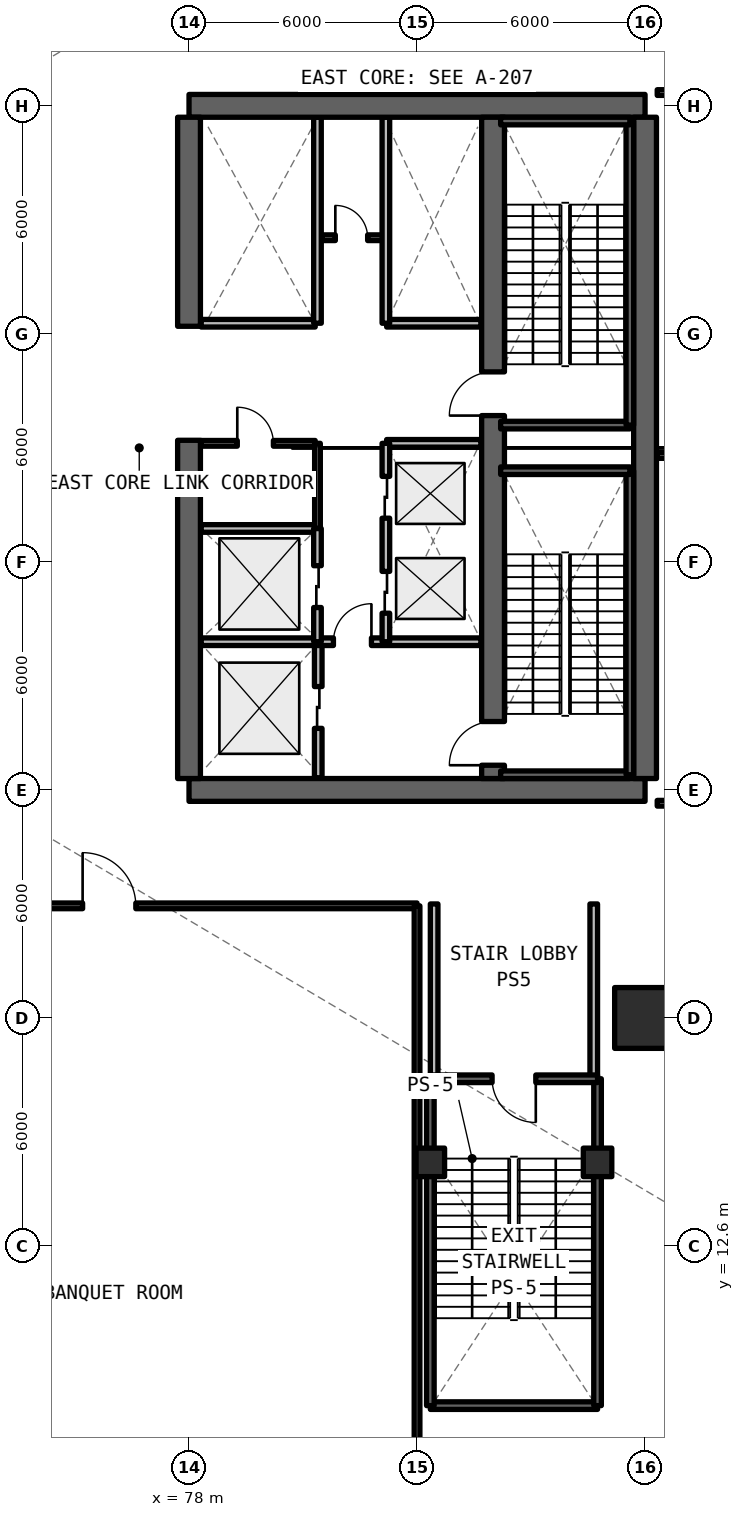
"""IFC4 building model, lengths in metres.
Left out: names, types, materials, properties, quantities, classifications, styles, units other than length and angle.
Written with IfcOpenShell. Run it as: python <this file> out.ifc"""

import sys

from ifc_helpers import new_model, si_unit, direction, frame, frame_2d, origin, origin_2d, place, context, subcontext, project, spatial, rectangle, extrude, element, fill, save


model = new_model("IFC4")
c1 = context("Model", 3, precision=1e-05, world=origin(), true_north=direction((0.0, 1.0)))
c2 = subcontext(c1, "Body", "Model", "MODEL_VIEW")
j1 = project(units=[si_unit("LENGTHUNIT", "METRE"), si_unit("PLANEANGLEUNIT", "RADIAN")], contexts=[c1])
p1 = place(None, origin())
s1 = spatial("IfcSite", under=j1, at=p1, CompositionType="ELEMENT")
p2 = place(p1, origin())
s2 = spatial("IfcBuilding", under=s1, at=p2, CompositionType="ELEMENT")
p3 = place(p2, frame((0.0, 0.0, 9.9)))
s3 = spatial("IfcBuildingStorey", under=s2, at=p3, CompositionType="ELEMENT", Elevation=9.9)
for number, where, z_axis, x_axis in (
    (1, (78.0, 24.6, 0.0), (0.0, 0.0, 1.0), (1.0, 0.0, 0.0)),
    (2, (90.0, 42.6, 0.0), (0.0, 0.0, 1.0), (-1.0, 0.0, 0.0)),
):
    element("IfcWall", number, at=place(p3, frame(where, z_axis=z_axis, x_axis=x_axis)), inside=s3, PredefinedType="SHEAR", context=c2, shape_type="SweptSolid", body=[
        extrude(rectangle(XDim=12.0, YDim=0.6, at=frame_2d((6.0, 0.0))), origin(), (0.0, 0.0, 1.0), 4.95),
    ])
p4 = place(p3, frame((90.0, 24.9, 0.0), z_axis=(0.0, 0.0, 1.0), x_axis=(0.0, 1.0, 0.0)))
e3 = element("IfcWall", 3, at=p4, inside=s3, PredefinedType="SHEAR", context=c2, shape_type="SweptSolid", body=[
    extrude(rectangle(XDim=17.4, YDim=0.6, at=frame_2d((8.7, 0.0))), origin(), (0.0, 0.0, 1.0), 4.95),
])
p5 = place(p3, frame((78.0, 24.9, 0.0), z_axis=(0.0, 0.0, 1.0), x_axis=(0.0, 1.0, 0.0)))
e4 = element("IfcWall", 4, at=p5, inside=s3, PredefinedType="SHEAR", context=c2, shape_type="SweptSolid", body=[
    extrude(rectangle(XDim=8.9, YDim=0.6, at=frame_2d((4.45, 0.0))), origin(), (0.0, 0.0, 1.0), 4.95),
])
p6 = place(p3, frame((78.0, 36.8, 0.0), z_axis=(0.0, 0.0, 1.0), x_axis=(0.0, 1.0, 0.0)))
e5 = element("IfcWall", 5, at=p6, inside=s3, PredefinedType="SHEAR", context=c2, shape_type="SweptSolid", body=[
    extrude(rectangle(XDim=5.5, YDim=0.6, at=frame_2d((2.75, 0.0))), origin(), (0.0, 0.0, 1.0), 4.95),
])
p7 = place(p3, frame((86.0, 24.9, 0.0), z_axis=(0.0, 0.0, 1.0), x_axis=(0.0, 1.0, 0.0)))
e6 = element("IfcWall", 6, at=p7, inside=s3, PredefinedType="SHEAR", context=c2, shape_type="SweptSolid", body=[
    extrude(rectangle(XDim=17.4, YDim=0.6, at=frame_2d((8.7, 0.0))), origin(), (0.0, 0.0, 1.0), 4.95),
])
p8 = place(p7, frame((0.35, 0.0, 0.0)))
e7 = element("IfcOpeningElement", 7, at=p8, cuts=e6, PredefinedType="OPENING", context=c2, shape_type="SweptSolid", body=[
    extrude(rectangle(XDim=1.15, YDim=2.15, at=frame_2d((0.575, 1.075))), frame((0.0, 0.31, 0.0), z_axis=(0.0, -1.0, 0.0), x_axis=(1.0, 0.0, 0.0)), (0.0, 0.0, 1.0), 0.62),
])
p9 = place(p7, frame((9.55, 0.0, 0.0)))
e8 = element("IfcOpeningElement", 8, at=p9, cuts=e6, PredefinedType="OPENING", context=c2, shape_type="SweptSolid", body=[
    extrude(rectangle(XDim=1.15, YDim=2.15, at=frame_2d((0.575, 1.075))), frame((0.0, 0.31, 0.0), z_axis=(0.0, -1.0, 0.0), x_axis=(1.0, 0.0, 0.0)), (0.0, 0.0, 1.0), 0.62),
])
p10 = place(p3, frame((90.0, 18.6, 0.0), z_axis=(0.0, 0.0, 1.0), x_axis=(1.0, 0.0, 0.0)))
e9 = element("IfcColumn", 9, at=p10, inside=s3, PredefinedType="COLUMN", context=c2, shape_type="SweptSolid", body=[
    extrude(rectangle(XDim=1.6, YDim=1.6, at=origin_2d()), origin(), (0.0, 0.0, 1.0), 4.95),
])
for number, where, z_axis, x_axis in (
    (10, (84.35, 14.8, 0.0), (0.0, 0.0, 1.0), (1.0, 0.0, 0.0)),
    (11, (88.75, 14.8, 0.0), (0.0, 0.0, 1.0), (1.0, 0.0, 0.0)),
):
    element("IfcColumn", number, at=place(p3, frame(where, z_axis=z_axis, x_axis=x_axis)), inside=s3, PredefinedType="COLUMN", context=c2, shape_type="SweptSolid", body=[
        extrude(rectangle(XDim=0.75, YDim=0.75, at=origin_2d()), origin(), (0.0, 0.0, 1.0), 4.95),
    ])
p11 = place(p3, frame((81.4, 24.92, 0.0), z_axis=(0.0, 0.0, 1.0), x_axis=(0.0, 1.0, 0.0)))
e12 = element("IfcWall", 12, at=p11, inside=s3, PredefinedType="SOLIDWALL", context=c2, shape_type="SweptSolid", body=[
    extrude(rectangle(XDim=3.58, YDim=0.2, at=frame_2d((1.79, 0.0))), origin(), (0.0, 0.0, 1.0), 3.89),
])
p12 = place(p11, frame((1.3, 0.0, 0.0)))
e13 = element("IfcOpeningElement", 13, at=p12, cuts=e12, PredefinedType="OPENING", context=c2, shape_type="SweptSolid", body=[
    extrude(rectangle(XDim=1.1, YDim=2.2, at=frame_2d((0.55, 1.1))), frame((0.0, 0.11, 0.0), z_axis=(0.0, -1.0, 0.0), x_axis=(1.0, 0.0, 0.0)), (0.0, 0.0, 1.0), 0.22),
])
p13 = place(p3, frame((78.32, 28.5, 0.0), z_axis=(0.0, 0.0, 1.0), x_axis=(1.0, 0.0, 0.0)))
e14 = element("IfcWall", 14, at=p13, inside=s3, PredefinedType="SOLIDWALL", context=c2, shape_type="SweptSolid", body=[
    extrude(rectangle(XDim=7.36, YDim=0.2, at=frame_2d((3.68, 0.0))), origin(), (0.0, 0.0, 1.0), 3.89),
])
p14 = place(p13, frame((3.48, 0.0, 0.0)))
e15 = element("IfcOpeningElement", 15, at=p14, cuts=e14, PredefinedType="OPENING", context=c2, shape_type="SweptSolid", body=[
    extrude(rectangle(XDim=1.0, YDim=2.15, at=frame_2d((0.5, 1.075))), frame((0.0, 0.11, 0.0), z_axis=(0.0, -1.0, 0.0), x_axis=(1.0, 0.0, 0.0)), (0.0, 0.0, 1.0), 0.22),
])
p15 = place(p3, frame((81.5, 39.13, 0.0), z_axis=(0.0, 0.0, 1.0), x_axis=(1.0, 0.0, 0.0)))
e16 = element("IfcWall", 16, at=p15, inside=s3, PredefinedType="SOLIDWALL", context=c2, shape_type="SweptSolid", body=[
    extrude(rectangle(XDim=1.6, YDim=0.15, at=frame_2d((0.8, 0.0))), origin(), (0.0, 0.0, 1.0), 3.89),
])
p16 = place(p15, frame((0.35, 0.0, 0.0)))
e17 = element("IfcOpeningElement", 17, at=p16, cuts=e16, PredefinedType="OPENING", context=c2, shape_type="SweptSolid", body=[
    extrude(rectangle(XDim=0.85, YDim=2.1, at=frame_2d((0.425, 1.05))), frame((0.0, 0.085, 0.0), z_axis=(0.0, -1.0, 0.0), x_axis=(1.0, 0.0, 0.0)), (0.0, 0.0, 1.0), 0.17),
])
p17 = place(p3, frame((83.2, 33.72, 0.0), z_axis=(0.0, 0.0, 1.0), x_axis=(1.0, 0.0, 0.0)))
e18 = element("IfcWall", 18, at=p17, inside=s3, PredefinedType="SOLIDWALL", context=c2, shape_type="SweptSolid", body=[
    extrude(rectangle(XDim=2.48, YDim=0.2, at=frame_2d((1.24, 0.0))), origin(), (0.0, 0.0, 1.0), 3.89),
])
p18 = place(p3, frame((83.18, 28.5, 0.0), z_axis=(0.0, 0.0, 1.0), x_axis=(0.0, 1.0, 0.0)))
e19 = element("IfcWall", 19, at=p18, inside=s3, PredefinedType="SOLIDWALL", context=c2, shape_type="SweptSolid", body=[
    extrude(rectangle(XDim=5.22, YDim=0.2, at=frame_2d((2.61, 0.0))), origin(), (0.0, 0.0, 1.0), 3.89),
])
p19 = place(p18, frame((0.75, 0.0, 0.0)))
e20 = element("IfcOpeningElement", 20, at=p19, cuts=e19, PredefinedType="OPENING", context=c2, shape_type="SweptSolid", body=[
    extrude(rectangle(XDim=1.1, YDim=2.2, at=frame_2d((0.55, 1.1))), frame((0.0, 0.11, 0.0), z_axis=(0.0, -1.0, 0.0), x_axis=(1.0, 0.0, 0.0)), (0.0, 0.0, 1.0), 0.22),
])
p20 = place(p18, frame((3.25, 0.0, 0.0)))
e21 = element("IfcOpeningElement", 21, at=p20, cuts=e19, PredefinedType="OPENING", context=c2, shape_type="SweptSolid", body=[
    extrude(rectangle(XDim=1.1, YDim=2.2, at=frame_2d((0.55, 1.1))), frame((0.0, 0.11, 0.0), z_axis=(0.0, -1.0, 0.0), x_axis=(1.0, 0.0, 0.0)), (0.0, 0.0, 1.0), 0.22),
])
p21 = place(p3, frame((78.32, 31.48, 0.0), z_axis=(0.0, 0.0, 1.0), x_axis=(1.0, 0.0, 0.0)))
e22 = element("IfcWall", 22, at=p21, inside=s3, PredefinedType="SOLIDWALL", context=c2, shape_type="SweptSolid", body=[
    extrude(rectangle(XDim=3.0, YDim=0.2, at=frame_2d((1.5, 0.0))), origin(), (0.0, 0.0, 1.0), 3.89),
])
p22 = place(p3, frame((81.38, 28.5, 0.0), z_axis=(0.0, 0.0, 1.0), x_axis=(0.0, 1.0, 0.0)))
e23 = element("IfcWall", 23, at=p22, inside=s3, PredefinedType="SOLIDWALL", context=c2, shape_type="SweptSolid", body=[
    extrude(rectangle(XDim=2.98, YDim=0.2, at=frame_2d((1.49, 0.0))), origin(), (0.0, 0.0, 1.0), 3.89),
])
p23 = place(p22, frame((0.9, 0.0, 0.0)))
e24 = element("IfcOpeningElement", 24, at=p23, cuts=e23, PredefinedType="OPENING", context=c2, shape_type="SweptSolid", body=[
    extrude(rectangle(XDim=1.1, YDim=2.2, at=frame_2d((0.55, 1.1))), frame((0.0, 0.11, 0.0), z_axis=(0.0, -1.0, 0.0), x_axis=(1.0, 0.0, 0.0)), (0.0, 0.0, 1.0), 0.22),
])
p24 = place(p3, frame((81.38, 31.48, 0.0), z_axis=(0.0, 0.0, 1.0), x_axis=(0.0, 1.0, 0.0)))
e25 = element("IfcWall", 25, at=p24, inside=s3, PredefinedType="SOLIDWALL", context=c2, shape_type="SweptSolid", body=[
    extrude(rectangle(XDim=2.24, YDim=0.15, at=frame_2d((1.12, 0.0))), origin(), (0.0, 0.0, 1.0), 3.89),
])
p25 = place(p3, frame((78.32, 33.72, 0.0), z_axis=(0.0, 0.0, 1.0), x_axis=(1.0, 0.0, 0.0)))
e26 = element("IfcWall", 26, at=p25, inside=s3, PredefinedType="SOLIDWALL", context=c2, shape_type="SweptSolid", body=[
    extrude(rectangle(XDim=3.0, YDim=0.15, at=frame_2d((1.5, 0.0))), origin(), (0.0, 0.0, 1.0), 3.89),
])
p26 = place(p25, frame((0.95, 0.0, 0.0)))
e27 = element("IfcOpeningElement", 27, at=p26, cuts=e26, PredefinedType="OPENING", context=c2, shape_type="SweptSolid", body=[
    extrude(rectangle(XDim=0.95, YDim=2.15, at=frame_2d((0.475, 1.075))), frame((0.0, 0.085, 0.0), z_axis=(0.0, -1.0, 0.0), x_axis=(1.0, 0.0, 0.0)), (0.0, 0.0, 1.0), 0.17),
])
p27 = place(p3, frame((83.2, 36.88, 0.0), z_axis=(0.0, 0.0, 1.0), x_axis=(1.0, 0.0, 0.0)))
e28 = element("IfcWall", 28, at=p27, inside=s3, PredefinedType="SOLIDWALL", context=c2, shape_type="SweptSolid", body=[
    extrude(rectangle(XDim=2.48, YDim=0.2, at=frame_2d((1.24, 0.0))), origin(), (0.0, 0.0, 1.0), 3.89),
])
p28 = place(p3, frame((83.18, 36.88, 0.0), z_axis=(0.0, 0.0, 1.0), x_axis=(0.0, 1.0, 0.0)))
e29 = element("IfcWall", 29, at=p28, inside=s3, PredefinedType="SOLIDWALL", context=c2, shape_type="SweptSolid", body=[
    extrude(rectangle(XDim=5.42, YDim=0.2, at=frame_2d((2.71, 0.0))), origin(), (0.0, 0.0, 1.0), 3.89),
])
p29 = place(p3, frame((78.32, 36.88, 0.0), z_axis=(0.0, 0.0, 1.0), x_axis=(1.0, 0.0, 0.0)))
e30 = element("IfcWall", 30, at=p29, inside=s3, PredefinedType="SOLIDWALL", context=c2, shape_type="SweptSolid", body=[
    extrude(rectangle(XDim=3.0, YDim=0.2, at=frame_2d((1.5, 0.0))), origin(), (0.0, 0.0, 1.0), 3.89),
])
p30 = place(p3, frame((81.38, 36.88, 0.0), z_axis=(0.0, 0.0, 1.0), x_axis=(0.0, 1.0, 0.0)))
e31 = element("IfcWall", 31, at=p30, inside=s3, PredefinedType="SOLIDWALL", context=c2, shape_type="SweptSolid", body=[
    extrude(rectangle(XDim=5.42, YDim=0.2, at=frame_2d((2.71, 0.0))), origin(), (0.0, 0.0, 1.0), 3.89),
])
for number, where, z_axis, x_axis in (
    (32, (84.45, 17.0, 0.0), (0.0, 0.0, 1.0), (0.0, 1.0, 0.0)),
    (33, (88.65, 17.0, 0.0), (0.0, 0.0, 1.0), (0.0, 1.0, 0.0)),
):
    element("IfcWall", number, at=place(p3, frame(where, z_axis=z_axis, x_axis=x_axis)), inside=s3, PredefinedType="SOLIDWALL", context=c2, shape_type="SweptSolid", body=[
        extrude(rectangle(XDim=4.6, YDim=0.2, at=frame_2d((2.3, 0.0))), origin(), (0.0, 0.0, 1.0), 3.89),
    ])
p31 = place(p3, frame((67.9, 21.55, 0.0), z_axis=(0.0, 0.0, 1.0), x_axis=(1.0, 0.0, 0.0)))
e34 = element("IfcWall", 34, at=p31, inside=s3, PredefinedType="SOLIDWALL", context=c2, shape_type="SweptSolid", body=[
    extrude(rectangle(XDim=16.1, YDim=0.15, at=frame_2d((8.05, 0.0))), origin(), (0.0, 0.0, 1.0), 3.89),
])
p32 = place(p31, frame((7.3, 0.0, 0.0)))
e35 = element("IfcOpeningElement", 35, at=p32, cuts=e34, PredefinedType="OPENING", context=c2, shape_type="SweptSolid", body=[
    extrude(rectangle(XDim=1.4, YDim=2.15, at=frame_2d((0.7, 1.075))), frame((0.0, 0.085, 0.0), z_axis=(0.0, -1.0, 0.0), x_axis=(1.0, 0.0, 0.0)), (0.0, 0.0, 1.0), 0.17),
])
p33 = place(p3, frame((84.0, 2.3, 0.0), z_axis=(0.0, 0.0, 1.0), x_axis=(0.0, 1.0, 0.0)))
e36 = element("IfcWall", 36, at=p33, inside=s3, PredefinedType="SOLIDWALL", context=c2, shape_type="SweptSolid", body=[
    extrude(rectangle(XDim=19.25, YDim=0.15, at=frame_2d((9.625, 0.0))), origin(), (0.0, 0.0, 1.0), 3.89),
])
p34 = place(p3, frame((90.32, 24.25, 0.0), z_axis=(0.0, 0.0, 1.0), x_axis=(1.0, 0.0, 0.0)))
e37 = element("IfcWall", 37, at=p34, inside=s3, PredefinedType="SOLIDWALL", context=c2, shape_type="SweptSolid", body=[
    extrude(rectangle(XDim=16.68, YDim=0.15, at=frame_2d((8.34, 0.0))), origin(), (0.0, 0.0, 1.0), 3.89),
])
p35 = place(p34, frame((7.79, 0.0, 0.0)))
e38 = element("IfcOpeningElement", 38, at=p35, cuts=e37, PredefinedType="OPENING", context=c2, shape_type="SweptSolid", body=[
    extrude(rectangle(XDim=1.1, YDim=2.15, at=frame_2d((0.55, 1.075))), frame((0.0, 0.085, 0.0), z_axis=(0.0, -1.0, 0.0), x_axis=(1.0, 0.0, 0.0)), (0.0, 0.0, 1.0), 0.17),
])
p36 = place(p3, frame((90.32, 33.4, 0.0), z_axis=(0.0, 0.0, 1.0), x_axis=(1.0, 0.0, 0.0)))
e39 = element("IfcWall", 39, at=p36, inside=s3, PredefinedType="SOLIDWALL", context=c2, shape_type="SweptSolid", body=[
    extrude(rectangle(XDim=16.68, YDim=0.15, at=frame_2d((8.34, 0.0))), origin(), (0.0, 0.0, 1.0), 3.89),
])
p37 = place(p3, frame((90.32, 42.95, 0.0), z_axis=(0.0, 0.0, 1.0), x_axis=(1.0, 0.0, 0.0)))
e40 = element("IfcWall", 40, at=p37, inside=s3, PredefinedType="SOLIDWALL", context=c2, shape_type="SweptSolid", body=[
    extrude(rectangle(XDim=16.68, YDim=0.15, at=frame_2d((8.34, 0.0))), origin(), (0.0, 0.0, 1.0), 3.89),
])
p38 = place(p37, frame((7.79, 0.0, 0.0)))
e41 = element("IfcOpeningElement", 41, at=p38, cuts=e40, PredefinedType="OPENING", context=c2, shape_type="SweptSolid", body=[
    extrude(rectangle(XDim=1.1, YDim=2.15, at=frame_2d((0.55, 1.075))), frame((0.0, 0.085, 0.0), z_axis=(0.0, -1.0, 0.0), x_axis=(1.0, 0.0, 0.0)), (0.0, 0.0, 1.0), 0.17),
])
p39 = place(p3, frame((86.2, 25.0, 0.0), z_axis=(0.0, 0.0, 1.0), x_axis=(1.0, 0.0, 0.0)))
e42 = element("IfcWall", 42, at=p39, inside=s3, PredefinedType="SOLIDWALL", context=c2, shape_type="SweptSolid", body=[
    extrude(rectangle(XDim=3.4, YDim=0.2, at=frame_2d((1.7, 0.0))), origin(), (0.0, 0.0, 1.0), 4.95),
])
p40 = place(p3, frame((89.6, 25.0, 0.0), z_axis=(0.0, 0.0, 1.0), x_axis=(0.0, 1.0, 0.0)))
e43 = element("IfcWall", 43, at=p40, inside=s3, PredefinedType="SOLIDWALL", context=c2, shape_type="SweptSolid", body=[
    extrude(rectangle(XDim=8.0, YDim=0.2, at=frame_2d((4.0, 0.0))), origin(), (0.0, 0.0, 1.0), 4.95),
])
for number, where, z_axis, x_axis in (
    (44, (89.6, 33.0, 0.0), (0.0, 0.0, 1.0), (-1.0, 0.0, 0.0)),
    (45, (86.2, 34.2, 0.0), (0.0, 0.0, 1.0), (1.0, 0.0, 0.0)),
):
    element("IfcWall", number, at=place(p3, frame(where, z_axis=z_axis, x_axis=x_axis)), inside=s3, PredefinedType="SOLIDWALL", context=c2, shape_type="SweptSolid", body=[
        extrude(rectangle(XDim=3.4, YDim=0.2, at=frame_2d((1.7, 0.0))), origin(), (0.0, 0.0, 1.0), 4.95),
    ])
p41 = place(p3, frame((89.6, 34.2, 0.0), z_axis=(0.0, 0.0, 1.0), x_axis=(0.0, 1.0, 0.0)))
e46 = element("IfcWall", 46, at=p41, inside=s3, PredefinedType="SOLIDWALL", context=c2, shape_type="SweptSolid", body=[
    extrude(rectangle(XDim=8.0, YDim=0.2, at=frame_2d((4.0, 0.0))), origin(), (0.0, 0.0, 1.0), 4.95),
])
p42 = place(p3, frame((89.6, 42.2, 0.0), z_axis=(0.0, 0.0, 1.0), x_axis=(-1.0, 0.0, 0.0)))
e47 = element("IfcWall", 47, at=p42, inside=s3, PredefinedType="SOLIDWALL", context=c2, shape_type="SweptSolid", body=[
    extrude(rectangle(XDim=3.4, YDim=0.2, at=frame_2d((1.7, 0.0))), origin(), (0.0, 0.0, 1.0), 4.95),
])
p43 = place(p3, frame((84.35, 8.4, 0.0), z_axis=(0.0, 0.0, 1.0), x_axis=(1.0, 0.0, 0.0)))
e48 = element("IfcWall", 48, at=p43, inside=s3, PredefinedType="SOLIDWALL", context=c2, shape_type="SweptSolid", body=[
    extrude(rectangle(XDim=4.4, YDim=0.2, at=frame_2d((2.2, 0.0))), origin(), (0.0, 0.0, 1.0), 4.95),
])
p44 = place(p3, frame((88.75, 8.4, 0.0), z_axis=(0.0, 0.0, 1.0), x_axis=(0.0, 1.0, 0.0)))
e49 = element("IfcWall", 49, at=p44, inside=s3, PredefinedType="SOLIDWALL", context=c2, shape_type="SweptSolid", body=[
    extrude(rectangle(XDim=8.6, YDim=0.2, at=frame_2d((4.3, 0.0))), origin(), (0.0, 0.0, 1.0), 4.95),
])
p45 = place(p3, frame((88.75, 17.0, 0.0), z_axis=(0.0, 0.0, 1.0), x_axis=(-1.0, 0.0, 0.0)))
e50 = element("IfcWall", 50, at=p45, inside=s3, PredefinedType="SOLIDWALL", context=c2, shape_type="SweptSolid", body=[
    extrude(rectangle(XDim=4.4, YDim=0.2, at=frame_2d((2.2, 0.0))), origin(), (0.0, 0.0, 1.0), 4.95),
])
p46 = place(p45, frame((1.625, 0.0, 0.0)))
e51 = element("IfcOpeningElement", 51, at=p46, cuts=e50, PredefinedType="OPENING", context=c2, shape_type="SweptSolid", body=[
    extrude(rectangle(XDim=1.15, YDim=2.15, at=frame_2d((0.575, 1.075))), frame((0.0, 0.11, 0.0), z_axis=(0.0, -1.0, 0.0), x_axis=(1.0, 0.0, 0.0)), (0.0, 0.0, 1.0), 0.22),
])
p47 = place(p3, frame((84.35, 17.0, 0.0), z_axis=(0.0, 0.0, 1.0), x_axis=(0.0, -1.0, 0.0)))
e52 = element("IfcWall", 52, at=p47, inside=s3, PredefinedType="SOLIDWALL", context=c2, shape_type="SweptSolid", body=[
    extrude(rectangle(XDim=8.6, YDim=0.2, at=frame_2d((4.3, 0.0))), origin(), (0.0, 0.0, 1.0), 4.95),
])
p48 = place(p12, origin())
e53 = element("IfcDoor", 53, at=p48, inside=s3, OperationType="SLIDING_TO_LEFT", PredefinedType="DOOR", context=c2, shape_type="SweptSolid", body=[
    extrude(rectangle(XDim=1.1, YDim=2.2, at=frame_2d((0.55, 1.1))), frame((0.0, 0.025, 0.0), z_axis=(0.0, -1.0, 0.0), x_axis=(1.0, 0.0, 0.0)), (0.0, 0.0, 1.0), 0.05),
])
fill(e13, e53)
p49 = place(p14, origin())
e54 = element("IfcDoor", 54, at=p49, inside=s3, OperationType="SINGLE_SWING_RIGHT", PredefinedType="DOOR", context=c2, shape_type="SweptSolid", body=[
    extrude(rectangle(XDim=1.0, YDim=2.15, at=frame_2d((0.5, 1.075))), frame((0.0, 0.025, 0.0), z_axis=(0.0, -1.0, 0.0), x_axis=(1.0, 0.0, 0.0)), (0.0, 0.0, 1.0), 0.05),
])
fill(e15, e54)
p50 = place(p16, origin())
e55 = element("IfcDoor", 55, at=p50, inside=s3, OperationType="SINGLE_SWING_LEFT", PredefinedType="DOOR", context=c2, shape_type="SweptSolid", body=[
    extrude(rectangle(XDim=0.85, YDim=2.1, at=frame_2d((0.425, 1.05))), frame((0.0, 0.025, 0.0), z_axis=(0.0, -1.0, 0.0), x_axis=(1.0, 0.0, 0.0)), (0.0, 0.0, 1.0), 0.05),
])
fill(e17, e55)
p51 = place(p19, origin())
e56 = element("IfcDoor", 56, at=p51, inside=s3, OperationType="SLIDING_TO_LEFT", PredefinedType="DOOR", context=c2, shape_type="SweptSolid", body=[
    extrude(rectangle(XDim=1.1, YDim=2.2, at=frame_2d((0.55, 1.1))), frame((0.0, 0.025, 0.0), z_axis=(0.0, -1.0, 0.0), x_axis=(1.0, 0.0, 0.0)), (0.0, 0.0, 1.0), 0.05),
])
fill(e20, e56)
p52 = place(p20, origin())
e57 = element("IfcDoor", 57, at=p52, inside=s3, OperationType="SLIDING_TO_RIGHT", PredefinedType="DOOR", context=c2, shape_type="SweptSolid", body=[
    extrude(rectangle(XDim=1.1, YDim=2.2, at=frame_2d((0.55, 1.1))), frame((0.0, 0.025, 0.0), z_axis=(0.0, -1.0, 0.0), x_axis=(1.0, 0.0, 0.0)), (0.0, 0.0, 1.0), 0.05),
])
fill(e21, e57)
p53 = place(p23, origin())
e58 = element("IfcDoor", 58, at=p53, inside=s3, OperationType="SLIDING_TO_LEFT", PredefinedType="DOOR", context=c2, shape_type="SweptSolid", body=[
    extrude(rectangle(XDim=1.1, YDim=2.2, at=frame_2d((0.55, 1.1))), frame((0.0, 0.025, 0.0), z_axis=(0.0, -1.0, 0.0), x_axis=(1.0, 0.0, 0.0)), (0.0, 0.0, 1.0), 0.05),
])
fill(e24, e58)
p54 = place(p26, origin())
e59 = element("IfcDoor", 59, at=p54, inside=s3, OperationType="SINGLE_SWING_LEFT", PredefinedType="DOOR", context=c2, shape_type="SweptSolid", body=[
    extrude(rectangle(XDim=0.95, YDim=2.15, at=frame_2d((0.475, 1.075))), frame((0.0, 0.025, 0.0), z_axis=(0.0, -1.0, 0.0), x_axis=(1.0, 0.0, 0.0)), (0.0, 0.0, 1.0), 0.05),
])
fill(e27, e59)
p55 = place(p32, origin())
e60 = element("IfcDoor", 60, at=p55, inside=s3, OperationType="SINGLE_SWING_LEFT", PredefinedType="DOOR", context=c2, shape_type="SweptSolid", body=[
    extrude(rectangle(XDim=1.4, YDim=2.15, at=frame_2d((0.7, 1.075))), frame((0.0, 0.025, 0.0), z_axis=(0.0, -1.0, 0.0), x_axis=(1.0, 0.0, 0.0)), (0.0, 0.0, 1.0), 0.05),
])
fill(e35, e60)
p56 = place(p8, origin())
e61 = element("IfcDoor", 61, at=p56, inside=s3, OperationType="SINGLE_SWING_RIGHT", PredefinedType="DOOR", context=c2, shape_type="SweptSolid", body=[
    extrude(rectangle(XDim=1.15, YDim=2.15, at=frame_2d((0.575, 1.075))), frame((0.0, 0.025, 0.0), z_axis=(0.0, -1.0, 0.0), x_axis=(1.0, 0.0, 0.0)), (0.0, 0.0, 1.0), 0.05),
])
fill(e7, e61)
p57 = place(p9, origin())
e62 = element("IfcDoor", 62, at=p57, inside=s3, OperationType="SINGLE_SWING_LEFT", PredefinedType="DOOR", context=c2, shape_type="SweptSolid", body=[
    extrude(rectangle(XDim=1.15, YDim=2.15, at=frame_2d((0.575, 1.075))), frame((0.0, 0.025, 0.0), z_axis=(0.0, -1.0, 0.0), x_axis=(1.0, 0.0, 0.0)), (0.0, 0.0, 1.0), 0.05),
])
fill(e8, e62)
p58 = place(p46, origin())
e63 = element("IfcDoor", 63, at=p58, inside=s3, OperationType="SINGLE_SWING_RIGHT", PredefinedType="DOOR", context=c2, shape_type="SweptSolid", body=[
    extrude(rectangle(XDim=1.15, YDim=2.15, at=frame_2d((0.575, 1.075))), frame((0.0, 0.025, 0.0), z_axis=(0.0, -1.0, 0.0), x_axis=(1.0, 0.0, 0.0)), (0.0, 0.0, 1.0), 0.05),
])
fill(e51, e63)
save(model, sys.argv[1])
